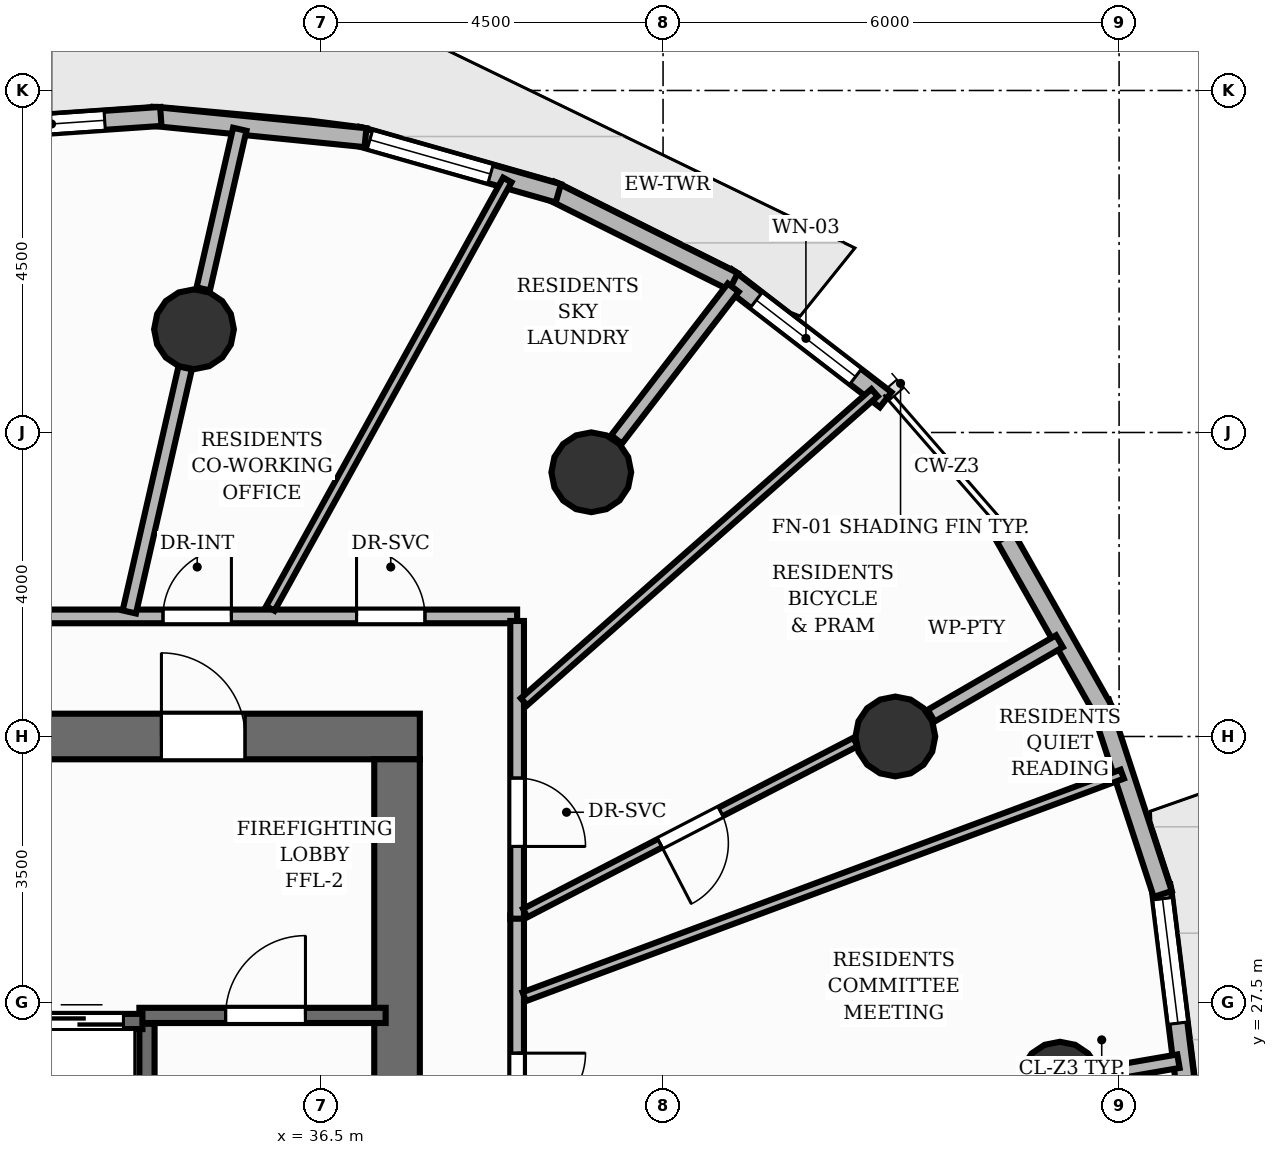
"""IFC4 building model, lengths in metres.
Left out: names, types, materials, properties, quantities, classifications, styles, units other than length and angle.
Written with IfcOpenShell. Run it as: python <this file> out.ifc"""

import sys

from ifc_helpers import new_model, si_unit, direction, frame, frame_2d, origin, origin_2d, place, context, subcontext, project, spatial, rectangle, circle, extrude, element, fill, save


model = new_model("IFC4")
c1 = context("Model", 3, precision=1e-05, world=origin(), true_north=direction((0.0, 1.0)))
c2 = subcontext(c1, "Body", "Model", "MODEL_VIEW")
j1 = project(units=[si_unit("LENGTHUNIT", "METRE"), si_unit("PLANEANGLEUNIT", "RADIAN")], contexts=[c1])
p1 = place(None, origin())
s1 = spatial("IfcSite", under=j1, at=p1, CompositionType="ELEMENT")
p2 = place(p1, origin())
s2 = spatial("IfcBuilding", under=s1, at=p2, CompositionType="ELEMENT")
p3 = place(p2, frame((0.0, 0.0, 142.56)))
s3 = spatial("IfcBuildingStorey", under=s2, at=p3, CompositionType="ELEMENT", Elevation=142.56)
p4 = place(p3, frame((22.7, 31.0, 0.0), z_axis=(0.0, 0.0, 1.0), x_axis=(1.0, 0.0, 0.0)))
e1 = element("IfcWall", 1, at=p4, inside=s3, PredefinedType="SHEAR", context=c2, shape_type="SweptSolid", body=[
    extrude(rectangle(XDim=15.1, YDim=0.6, at=frame_2d((7.55, 0.0))), origin(), (0.0, 0.0, 1.0), 3.2),
])
p5 = place(p4, frame((11.7, 0.0, 0.0)))
e2 = element("IfcOpeningElement", 2, at=p5, cuts=e1, PredefinedType="OPENING", context=c2, shape_type="SweptSolid", body=[
    extrude(rectangle(XDim=1.1, YDim=2.15, at=frame_2d((0.55, 1.075))), frame((0.0, 0.31, 0.0), z_axis=(0.0, -1.0, 0.0), x_axis=(1.0, 0.0, 0.0)), (0.0, 0.0, 1.0), 0.62),
])
p6 = place(p3, frame((37.5, 17.3, 0.0), z_axis=(0.0, 0.0, 1.0), x_axis=(0.0, 1.0, 0.0)))
e3 = element("IfcWall", 3, at=p6, inside=s3, PredefinedType="SHEAR", context=c2, shape_type="SweptSolid", body=[
    extrude(rectangle(XDim=13.4, YDim=0.6, at=frame_2d((6.7, 0.0))), origin(), (0.0, 0.0, 1.0), 3.2),
])
for number, where, z_axis, x_axis in (
    (4, (46.221, 26.458, 0.0), (0.0, 0.0, 1.0), (1.0, 0.0, 0.0)),
    (5, (44.056, 31.0, 0.0), (0.0, 0.0, 1.0), (1.0, 0.0, 0.0)),
    (6, (40.056, 34.477, 0.0), (0.0, 0.0, 1.0), (1.0, 0.0, 0.0)),
    (7, (34.829, 36.358, 0.0), (0.0, 0.0, 1.0), (1.0, 0.0, 0.0)),
):
    element("IfcColumn", number, at=place(p3, frame(where, z_axis=z_axis, x_axis=x_axis)), inside=s3, PredefinedType="COLUMN", context=c2, shape_type="SweptSolid", body=[
        extrude(circle(Radius=0.525, at=origin_2d()), origin(), (0.0, 0.0, 1.0), 3.2),
    ])
p7 = place(p3, frame((41.831, 37.046, 0.0), z_axis=(0.0, 0.0, 1.0), x_axis=(0.7923805969, -0.610027040103, 0.0)))
e8 = element("IfcWall", 8, at=p7, inside=s3, PredefinedType="SOLIDWALL", context=c2, shape_type="SweptSolid", body=[
    extrude(rectangle(XDim=2.648, YDim=0.25, at=frame_2d((1.324, 0.0))), origin(), (0.0, 0.0, 1.0), 2.96),
])
p8 = place(p7, frame((0.499, 0.0, 0.85)))
e9 = element("IfcOpeningElement", 9, at=p8, cuts=e8, PredefinedType="OPENING", context=c2, shape_type="SweptSolid", body=[
    extrude(rectangle(XDim=1.65, YDim=1.55, at=frame_2d((0.825, 0.775))), frame((0.0, 0.135, 0.0), z_axis=(0.0, -1.0, 0.0), x_axis=(1.0, 0.0, 0.0)), (0.0, 0.0, 1.0), 0.27),
])
p9 = place(p3, frame((39.517, 38.188, 0.0), z_axis=(0.0, 0.0, 1.0), x_axis=(0.894843809708, -0.446379385979, 0.0)))
e10 = element("IfcWall", 10, at=p9, inside=s3, PredefinedType="SOLIDWALL", context=c2, shape_type="SweptSolid", body=[
    extrude(rectangle(XDim=2.693, YDim=0.25, at=frame_2d((1.347, 0.0))), origin(), (0.0, 0.0, 1.0), 2.96),
])
p10 = place(p3, frame((36.975, 38.9, 0.0), z_axis=(0.0, 0.0, 1.0), x_axis=(0.961851311091, -0.27357276062, 0.0)))
e11 = element("IfcWall", 11, at=p10, inside=s3, PredefinedType="SOLIDWALL", context=c2, shape_type="SweptSolid", body=[
    extrude(rectangle(XDim=2.752, YDim=0.25, at=frame_2d((1.376, 0.0))), origin(), (0.0, 0.0, 1.0), 2.96),
])
p11 = place(p10, frame((0.175, 0.0, 0.85)))
e12 = element("IfcOpeningElement", 12, at=p11, cuts=e11, PredefinedType="OPENING", context=c2, shape_type="SweptSolid", body=[
    extrude(rectangle(XDim=1.65, YDim=1.55, at=frame_2d((0.825, 0.775))), frame((0.0, 0.135, 0.0), z_axis=(0.0, -1.0, 0.0), x_axis=(1.0, 0.0, 0.0)), (0.0, 0.0, 1.0), 0.27),
])
p12 = place(p3, frame((34.281, 39.16, 0.0), z_axis=(0.0, 0.0, 1.0), x_axis=(0.995013999105, -0.099735357744, 0.0)))
e13 = element("IfcWall", 13, at=p12, inside=s3, PredefinedType="SOLIDWALL", context=c2, shape_type="SweptSolid", body=[
    extrude(rectangle(XDim=2.818, YDim=0.25, at=frame_2d((1.409, 0.0))), origin(), (0.0, 0.0, 1.0), 2.96),
])
p13 = place(p3, frame((31.517, 38.96, 0.0), z_axis=(0.0, 0.0, 1.0), x_axis=(0.997630729469, 0.068796276206, 0.0)))
e14 = element("IfcWall", 14, at=p13, inside=s3, PredefinedType="SOLIDWALL", context=c2, shape_type="SweptSolid", body=[
    extrude(rectangle(XDim=2.882, YDim=0.25, at=frame_2d((1.441, 0.0))), origin(), (0.0, 0.0, 1.0), 2.96),
])
p14 = place(p13, frame((0.741, 0.0, 0.85)))
e15 = element("IfcOpeningElement", 15, at=p14, cuts=e14, PredefinedType="OPENING", context=c2, shape_type="SweptSolid", body=[
    extrude(rectangle(XDim=1.4, YDim=1.55, at=frame_2d((0.7, 0.775))), frame((0.0, 0.135, 0.0), z_axis=(0.0, -1.0, 0.0), x_axis=(1.0, 0.0, 0.0)), (0.0, 0.0, 1.0), 0.27),
])
p15 = place(p3, frame((47.549, 29.039, 0.0), z_axis=(0.0, 0.0, 1.0), x_axis=(0.123197890413, -0.992382123881, 0.0)))
e16 = element("IfcWall", 16, at=p15, inside=s3, PredefinedType="SOLIDWALL", context=c2, shape_type="SweptSolid", body=[
    extrude(rectangle(XDim=2.693, YDim=0.25, at=frame_2d((1.347, 0.0))), origin(), (0.0, 0.0, 1.0), 2.96),
])
p16 = place(p15, frame((0.175, 0.0, 0.85)))
e17 = element("IfcOpeningElement", 17, at=p16, cuts=e16, PredefinedType="OPENING", context=c2, shape_type="SweptSolid", body=[
    extrude(rectangle(XDim=1.65, YDim=1.55, at=frame_2d((0.825, 0.775))), frame((0.0, 0.135, 0.0), z_axis=(0.0, -1.0, 0.0), x_axis=(1.0, 0.0, 0.0)), (0.0, 0.0, 1.0), 0.27),
])
p17 = place(p3, frame((46.749, 31.444, 0.0), z_axis=(0.0, 0.0, 1.0), x_axis=(0.311522010952, -0.950238936633, 0.0)))
e18 = element("IfcWall", 18, at=p17, inside=s3, PredefinedType="SOLIDWALL", context=c2, shape_type="SweptSolid", body=[
    extrude(rectangle(XDim=2.648, YDim=0.25, at=frame_2d((1.324, 0.0))), origin(), (0.0, 0.0, 1.0), 2.96),
])
p18 = place(p3, frame((45.502, 33.623, 0.0), z_axis=(0.0, 0.0, 1.0), x_axis=(0.492909281161, -0.870080709214, 0.0)))
e19 = element("IfcWall", 19, at=p18, inside=s3, PredefinedType="SOLIDWALL", context=c2, shape_type="SweptSolid", body=[
    extrude(rectangle(XDim=2.624, YDim=0.25, at=frame_2d((1.312, 0.0))), origin(), (0.0, 0.0, 1.0), 2.96),
])
p19 = place(p3, frame((34.21, 20.78, 0.0), z_axis=(0.0, 0.0, 1.0), x_axis=(0.0, 1.0, 0.0)))
e20 = element("IfcWall", 20, at=p19, inside=s3, PredefinedType="SHEAR", context=c2, shape_type="SweptSolid", body=[
    extrude(rectangle(XDim=6.44, YDim=0.2, at=frame_2d((3.22, 0.0))), origin(), (0.0, 0.0, 1.0), 3.2),
])
p20 = place(p3, frame((34.11, 27.33, 0.0), z_axis=(0.0, 0.0, 1.0), x_axis=(1.0, 0.0, 0.0)))
e21 = element("IfcWall", 21, at=p20, inside=s3, PredefinedType="SHEAR", context=c2, shape_type="SweptSolid", body=[
    extrude(rectangle(XDim=3.24, YDim=0.2, at=frame_2d((1.62, 0.0))), origin(), (0.0, 0.0, 1.0), 3.2),
])
p21 = place(p20, frame((1.135, 0.0, 0.0)))
e22 = element("IfcOpeningElement", 22, at=p21, cuts=e21, PredefinedType="OPENING", context=c2, shape_type="SweptSolid", body=[
    extrude(rectangle(XDim=1.05, YDim=2.15, at=frame_2d((0.525, 1.075))), frame((0.0, 0.11, 0.0), z_axis=(0.0, -1.0, 0.0), x_axis=(1.0, 0.0, 0.0)), (0.0, 0.0, 1.0), 0.22),
])
p22 = place(p3, frame((31.85, 27.25, 0.0), z_axis=(0.0, 0.0, 1.0), x_axis=(1.0, 0.0, 0.0)))
e23 = element("IfcWall", 23, at=p22, inside=s3, PredefinedType="SHEAR", context=c2, shape_type="SweptSolid", body=[
    extrude(rectangle(XDim=2.3, YDim=0.2, at=frame_2d((1.15, 0.0))), origin(), (0.0, 0.0, 1.0), 3.2),
])
p23 = place(p22, frame((0.95, 0.0, 0.0)))
e24 = element("IfcOpeningElement", 24, at=p23, cuts=e23, PredefinedType="OPENING", context=c2, shape_type="SweptSolid", body=[
    extrude(rectangle(XDim=1.1, YDim=2.15, at=frame_2d((0.55, 1.075))), frame((0.0, 0.11, 0.0), z_axis=(0.0, -1.0, 0.0), x_axis=(1.0, 0.0, 0.0)), (0.0, 0.0, 1.0), 0.22),
])
p24 = place(p3, frame((46.758, 26.551, 0.0), z_axis=(0.0, 0.0, 1.0), x_axis=(0.985390767806, 0.170308645474, 0.0)))
e25 = element("IfcWall", 25, at=p24, inside=s3, PredefinedType="PARTITIONING", context=c2, shape_type="SweptSolid", body=[
    extrude(rectangle(XDim=1.038, YDim=0.18, at=frame_2d((0.519, 0.0))), origin(), (0.0, 0.0, 1.0), 2.336),
])
p25 = place(p3, frame((44.528, 31.274, 0.0), z_axis=(0.0, 0.0, 1.0), x_axis=(0.864802971131, 0.502111363268, 0.0)))
e26 = element("IfcWall", 26, at=p25, inside=s3, PredefinedType="PARTITIONING", context=c2, shape_type="SweptSolid", body=[
    extrude(rectangle(XDim=1.951, YDim=0.18, at=frame_2d((0.975, 0.0))), origin(), (0.0, 0.0, 1.0), 2.336),
])
p26 = place(p3, frame((40.388, 34.908, 0.0), z_axis=(0.0, 0.0, 1.0), x_axis=(0.609556175004, 0.792742877303, 0.0)))
e27 = element("IfcWall", 27, at=p26, inside=s3, PredefinedType="PARTITIONING", context=c2, shape_type="SweptSolid", body=[
    extrude(rectangle(XDim=2.519, YDim=0.18, at=frame_2d((1.259, 0.0))), origin(), (0.0, 0.0, 1.0), 2.336),
])
p27 = place(p3, frame((34.95, 36.889, 0.0), z_axis=(0.0, 0.0, 1.0), x_axis=(0.223080127706, 0.974800111111, 0.0)))
e28 = element("IfcWall", 28, at=p27, inside=s3, PredefinedType="PARTITIONING", context=c2, shape_type="SweptSolid", body=[
    extrude(rectangle(XDim=2.155, YDim=0.18, at=frame_2d((1.077, 0.0))), origin(), (0.0, 0.0, 1.0), 2.336),
])
p28 = place(p3, frame((39.08, 28.645, 0.0), z_axis=(0.0, 0.0, 1.0), x_axis=(0.0, -1.0, 0.0)))
e29 = element("IfcWall", 29, at=p28, inside=s3, PredefinedType="PARTITIONING", context=c2, shape_type="SweptSolid", body=[
    extrude(rectangle(XDim=13.225, YDim=0.18, at=frame_2d((6.613, 0.0))), origin(), (0.0, 0.0, 1.0), 2.955),
])
p29 = place(p28, frame((6.545, 0.0, 0.0)))
e30 = element("IfcOpeningElement", 30, at=p29, cuts=e29, PredefinedType="OPENING", context=c2, shape_type="SweptSolid", body=[
    extrude(rectangle(XDim=1.05, YDim=2.15, at=frame_2d((0.525, 1.075))), frame((0.0, 0.1, 0.0), z_axis=(0.0, -1.0, 0.0), x_axis=(1.0, 0.0, 0.0)), (0.0, 0.0, 1.0), 0.2),
])
p30 = place(p28, frame((1.812, 0.0, 0.0)))
e31 = element("IfcOpeningElement", 31, at=p30, cuts=e29, PredefinedType="OPENING", context=c2, shape_type="SweptSolid", body=[
    extrude(rectangle(XDim=0.9, YDim=2.1, at=frame_2d((0.45, 1.05))), frame((0.0, 0.1, 0.0), z_axis=(0.0, -1.0, 0.0), x_axis=(1.0, 0.0, 0.0)), (0.0, 0.0, 1.0), 0.2),
])
p31 = place(p3, frame((21.42, 32.58, 0.0), z_axis=(0.0, 0.0, 1.0), x_axis=(1.0, 0.0, 0.0)))
e32 = element("IfcWall", 32, at=p31, inside=s3, PredefinedType="PARTITIONING", context=c2, shape_type="SweptSolid", body=[
    extrude(rectangle(XDim=17.66, YDim=0.18, at=frame_2d((8.83, 0.0))), origin(), (0.0, 0.0, 1.0), 2.955),
])
p32 = place(p31, frame((13.001, 0.0, 0.0)))
e33 = element("IfcOpeningElement", 33, at=p32, cuts=e32, PredefinedType="OPENING", context=c2, shape_type="SweptSolid", body=[
    extrude(rectangle(XDim=0.9, YDim=2.1, at=frame_2d((0.45, 1.05))), frame((0.0, 0.1, 0.0), z_axis=(0.0, -1.0, 0.0), x_axis=(1.0, 0.0, 0.0)), (0.0, 0.0, 1.0), 0.2),
])
p33 = place(p31, frame((15.547, 0.0, 0.0)))
e34 = element("IfcOpeningElement", 34, at=p33, cuts=e32, PredefinedType="OPENING", context=c2, shape_type="SweptSolid", body=[
    extrude(rectangle(XDim=0.9, YDim=2.1, at=frame_2d((0.45, 1.05))), frame((0.0, 0.1, 0.0), z_axis=(0.0, -1.0, 0.0), x_axis=(1.0, 0.0, 0.0)), (0.0, 0.0, 1.0), 0.2),
])
p34 = place(p31, frame((5.757, 0.0, 0.0)))
e35 = element("IfcOpeningElement", 35, at=p34, cuts=e32, PredefinedType="OPENING", context=c2, shape_type="SweptSolid", body=[
    extrude(rectangle(XDim=1.05, YDim=2.15, at=frame_2d((0.525, 1.075))), frame((0.0, 0.1, 0.0), z_axis=(0.0, -1.0, 0.0), x_axis=(1.0, 0.0, 0.0)), (0.0, 0.0, 1.0), 0.2),
])
p35 = place(p3, frame((39.08, 32.52, 0.0), z_axis=(0.0, 0.0, 1.0), x_axis=(0.0, -1.0, 0.0)))
e36 = element("IfcWall", 36, at=p35, inside=s3, PredefinedType="PARTITIONING", context=c2, shape_type="SweptSolid", body=[
    extrude(rectangle(XDim=3.918, YDim=0.18, at=frame_2d((1.959, 0.0))), origin(), (0.0, 0.0, 1.0), 2.955),
])
p36 = place(p35, frame((2.067, 0.0, 0.0)))
e37 = element("IfcOpeningElement", 37, at=p36, cuts=e36, PredefinedType="OPENING", context=c2, shape_type="SweptSolid", body=[
    extrude(rectangle(XDim=0.9, YDim=2.1, at=frame_2d((0.45, 1.05))), frame((0.0, 0.1, 0.0), z_axis=(0.0, -1.0, 0.0), x_axis=(1.0, 0.0, 0.0)), (0.0, 0.0, 1.0), 0.2),
])
p37 = place(p3, frame((38.951, 38.323, 0.0), z_axis=(0.0, 0.0, 1.0), x_axis=(-0.484039777335, -0.875045995338, 0.0)))
e38 = element("IfcWall", 38, at=p37, inside=s3, PredefinedType="PARTITIONING", context=c2, shape_type="SweptSolid", body=[
    extrude(rectangle(XDim=6.442, YDim=0.125, at=frame_2d((3.221, 0.0))), origin(), (0.0, 0.0, 1.0), 2.955),
])
p38 = place(p3, frame((33.977, 32.638, 0.0), z_axis=(0.0, 0.0, 1.0), x_axis=(0.22319287001, 0.974774303506, 0.0)))
e39 = element("IfcWall", 39, at=p38, inside=s3, PredefinedType="PARTITIONING", context=c2, shape_type="SweptSolid", body=[
    extrude(rectangle(XDim=3.296, YDim=0.18, at=frame_2d((1.648, 0.0))), origin(), (0.0, 0.0, 1.0), 2.336),
])
p39 = place(p3, frame((43.783, 35.524, 0.0), z_axis=(0.0, 0.0, 1.0), x_axis=(-0.750018545151, -0.661416798947, 0.0)))
e40 = element("IfcWall", 40, at=p39, inside=s3, PredefinedType="PARTITIONING", context=c2, shape_type="SweptSolid", body=[
    extrude(rectangle(XDim=6.15, YDim=0.125, at=frame_2d((3.075, 0.0))), origin(), (0.0, 0.0, 1.0), 2.692),
])
p40 = place(p3, frame((43.531, 30.927, 0.0), z_axis=(0.0, 0.0, 1.0), x_axis=(-0.888041341995, -0.459763607638, 0.0)))
e41 = element("IfcWall", 41, at=p40, inside=s3, PredefinedType="PARTITIONING", context=c2, shape_type="SweptSolid", body=[
    extrude(rectangle(XDim=4.893, YDim=0.125, at=frame_2d((2.446, 0.0))), origin(), (0.0, 0.0, 1.0), 2.336),
])
p41 = place(p40, frame((1.996, 0.0, 0.0)))
e42 = element("IfcOpeningElement", 42, at=p41, cuts=e41, PredefinedType="OPENING", context=c2, shape_type="SweptSolid", body=[
    extrude(rectangle(XDim=0.9, YDim=2.1, at=frame_2d((0.45, 1.05))), frame((0.0, 0.073, 0.0), z_axis=(0.0, -1.0, 0.0), x_axis=(1.0, 0.0, 0.0)), (0.0, 0.0, 1.0), 0.145),
])
p42 = place(p3, frame((39.174, 27.577, 0.0), z_axis=(0.0, 0.0, 1.0), x_axis=(0.9372070401, 0.348773513883, 0.0)))
e43 = element("IfcWall", 43, at=p42, inside=s3, PredefinedType="PARTITIONING", context=c2, shape_type="SweptSolid", body=[
    extrude(rectangle(XDim=8.395, YDim=0.125, at=frame_2d((4.198, 0.0))), origin(), (0.0, 0.0, 1.0), 2.692),
])
p43 = place(p8, origin())
e44 = element("IfcWindow", 44, at=p43, inside=s3, PartitioningType="SINGLE_PANEL", PredefinedType="WINDOW", context=c2, shape_type="SweptSolid", body=[
    extrude(rectangle(XDim=1.65, YDim=1.55, at=frame_2d((0.825, 0.775))), frame((0.0, 0.03, 0.0), z_axis=(0.0, -1.0, 0.0), x_axis=(1.0, 0.0, 0.0)), (0.0, 0.0, 1.0), 0.06),
])
fill(e9, e44)
p44 = place(p11, origin())
e45 = element("IfcWindow", 45, at=p44, inside=s3, PartitioningType="SINGLE_PANEL", PredefinedType="WINDOW", context=c2, shape_type="SweptSolid", body=[
    extrude(rectangle(XDim=1.65, YDim=1.55, at=frame_2d((0.825, 0.775))), frame((0.0, 0.03, 0.0), z_axis=(0.0, -1.0, 0.0), x_axis=(1.0, 0.0, 0.0)), (0.0, 0.0, 1.0), 0.06),
])
fill(e12, e45)
p45 = place(p14, origin())
e46 = element("IfcWindow", 46, at=p45, inside=s3, PartitioningType="SINGLE_PANEL", PredefinedType="WINDOW", context=c2, shape_type="SweptSolid", body=[
    extrude(rectangle(XDim=1.4, YDim=1.55, at=frame_2d((0.7, 0.775))), frame((0.0, 0.03, 0.0), z_axis=(0.0, -1.0, 0.0), x_axis=(1.0, 0.0, 0.0)), (0.0, 0.0, 1.0), 0.06),
])
fill(e15, e46)
p46 = place(p16, origin())
e47 = element("IfcWindow", 47, at=p46, inside=s3, PartitioningType="SINGLE_PANEL", PredefinedType="WINDOW", context=c2, shape_type="SweptSolid", body=[
    extrude(rectangle(XDim=1.65, YDim=1.55, at=frame_2d((0.825, 0.775))), frame((0.0, 0.03, 0.0), z_axis=(0.0, -1.0, 0.0), x_axis=(1.0, 0.0, 0.0)), (0.0, 0.0, 1.0), 0.06),
])
fill(e17, e47)
p47 = place(p21, origin())
e48 = element("IfcDoor", 48, at=p47, inside=s3, OperationType="SINGLE_SWING_RIGHT", PredefinedType="DOOR", context=c2, shape_type="SweptSolid", body=[
    extrude(rectangle(XDim=1.05, YDim=2.15, at=frame_2d((0.525, 1.075))), frame((0.0, 0.025, 0.0), z_axis=(0.0, -1.0, 0.0), x_axis=(1.0, 0.0, 0.0)), (0.0, 0.0, 1.0), 0.05),
])
fill(e22, e48)
p48 = place(p5, origin())
e49 = element("IfcDoor", 49, at=p48, inside=s3, OperationType="SINGLE_SWING_LEFT", PredefinedType="DOOR", context=c2, shape_type="SweptSolid", body=[
    extrude(rectangle(XDim=1.1, YDim=2.15, at=frame_2d((0.55, 1.075))), frame((0.0, 0.025, 0.0), z_axis=(0.0, -1.0, 0.0), x_axis=(1.0, 0.0, 0.0)), (0.0, 0.0, 1.0), 0.05),
])
fill(e2, e49)
p49 = place(p23, origin())
e50 = element("IfcDoor", 50, at=p49, inside=s3, OperationType="DOUBLE_DOOR_SLIDING", PredefinedType="DOOR", context=c2, shape_type="SweptSolid", body=[
    extrude(rectangle(XDim=1.1, YDim=2.15, at=frame_2d((0.55, 1.075))), frame((0.0, 0.025, 0.0), z_axis=(0.0, -1.0, 0.0), x_axis=(1.0, 0.0, 0.0)), (0.0, 0.0, 1.0), 0.05),
])
fill(e24, e50)
p50 = place(p32, origin())
e51 = element("IfcDoor", 51, at=p50, inside=s3, OperationType="SINGLE_SWING_RIGHT", PredefinedType="DOOR", context=c2, shape_type="SweptSolid", body=[
    extrude(rectangle(XDim=0.9, YDim=2.1, at=frame_2d((0.45, 1.05))), frame((0.0, 0.025, 0.0), z_axis=(0.0, -1.0, 0.0), x_axis=(1.0, 0.0, 0.0)), (0.0, 0.0, 1.0), 0.05),
])
fill(e33, e51)
p51 = place(p33, origin())
e52 = element("IfcDoor", 52, at=p51, inside=s3, OperationType="SINGLE_SWING_LEFT", PredefinedType="DOOR", context=c2, shape_type="SweptSolid", body=[
    extrude(rectangle(XDim=0.9, YDim=2.1, at=frame_2d((0.45, 1.05))), frame((0.0, 0.025, 0.0), z_axis=(0.0, -1.0, 0.0), x_axis=(1.0, 0.0, 0.0)), (0.0, 0.0, 1.0), 0.05),
])
fill(e34, e52)
p52 = place(p36, origin())
e53 = element("IfcDoor", 53, at=p52, inside=s3, OperationType="SINGLE_SWING_RIGHT", PredefinedType="DOOR", context=c2, shape_type="SweptSolid", body=[
    extrude(rectangle(XDim=0.9, YDim=2.1, at=frame_2d((0.45, 1.05))), frame((0.0, 0.025, 0.0), z_axis=(0.0, -1.0, 0.0), x_axis=(1.0, 0.0, 0.0)), (0.0, 0.0, 1.0), 0.05),
])
fill(e37, e53)
p53 = place(p30, origin())
e54 = element("IfcDoor", 54, at=p53, inside=s3, OperationType="SINGLE_SWING_LEFT", PredefinedType="DOOR", context=c2, shape_type="SweptSolid", body=[
    extrude(rectangle(XDim=0.9, YDim=2.1, at=frame_2d((0.45, 1.05))), frame((0.0, 0.025, 0.0), z_axis=(0.0, -1.0, 0.0), x_axis=(1.0, 0.0, 0.0)), (0.0, 0.0, 1.0), 0.05),
])
fill(e31, e54)
p54 = place(p41, origin())
e55 = element("IfcDoor", 55, at=p54, inside=s3, OperationType="SINGLE_SWING_RIGHT", PredefinedType="DOOR", context=c2, shape_type="SweptSolid", body=[
    extrude(rectangle(XDim=0.9, YDim=2.1, at=frame_2d((0.45, 1.05))), frame((0.0, 0.025, 0.0), z_axis=(0.0, -1.0, 0.0), x_axis=(1.0, 0.0, 0.0)), (0.0, 0.0, 1.0), 0.05),
])
fill(e42, e55)
save(model, sys.argv[1])
